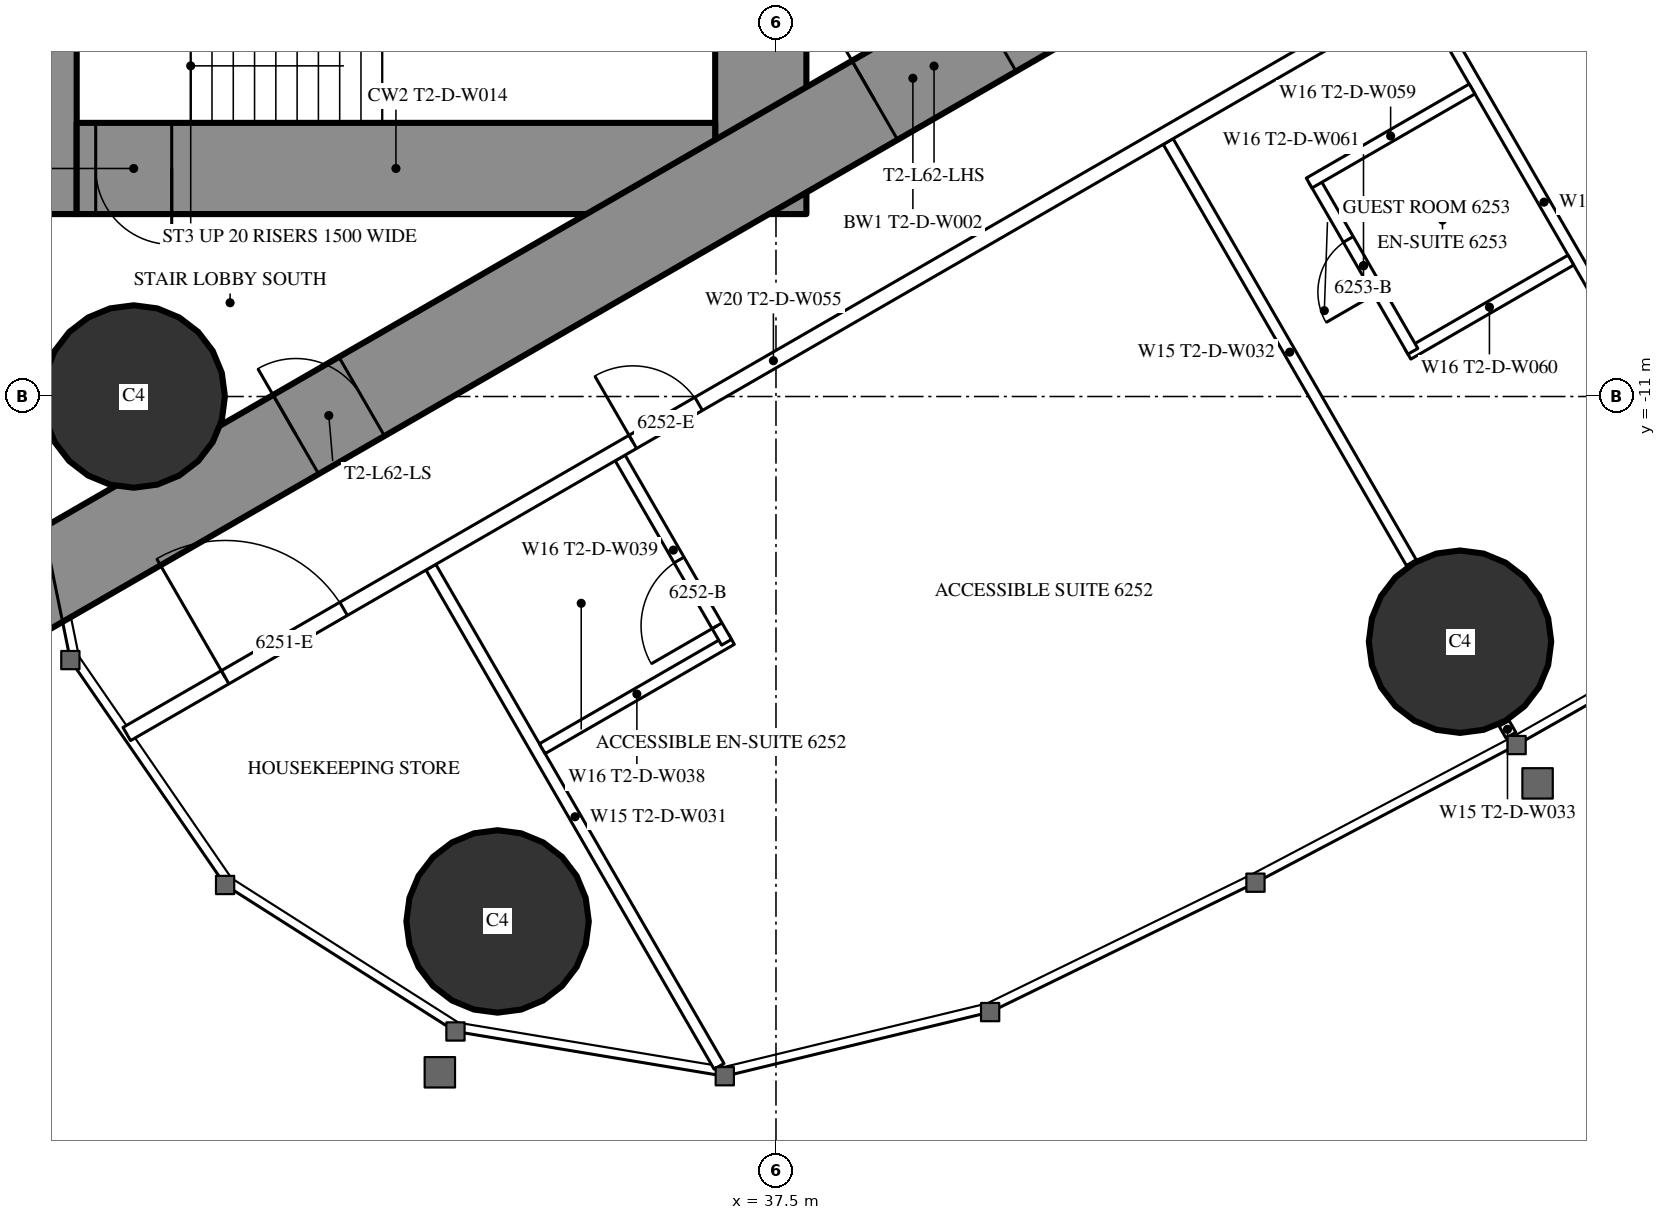
"""IFC4 building model, lengths in metres.
Left out: names, types, materials, properties, quantities, classifications, styles, units other than length and angle.
Written with IfcOpenShell. Run it as: python <this file> out.ifc"""

import sys

from ifc_helpers import new_model, si_unit, direction, frame, frame_2d, origin, origin_2d, place, context, subcontext, project, spatial, rectangle, circle, extrude, element, fill, save


model = new_model("IFC4")
c1 = context("Model", 3, precision=1e-05, world=origin(), true_north=direction((0.0, 1.0)))
c2 = subcontext(c1, "Body", "Model", "MODEL_VIEW")
j1 = project(units=[si_unit("LENGTHUNIT", "METRE"), si_unit("PLANEANGLEUNIT", "RADIAN")], contexts=[c1])
p1 = place(None, origin())
s1 = spatial("IfcSite", under=j1, at=p1, CompositionType="ELEMENT")
p2 = place(p1, origin())
s2 = spatial("IfcBuilding", under=s1, at=p2, CompositionType="ELEMENT")
p3 = place(p2, frame((0.0, 0.0, 233.3)))
s3 = spatial("IfcBuildingStorey", under=s2, at=p3, CompositionType="ELEMENT", Elevation=233.3)
for number, where, z_axis, x_axis in (
    (1, (33.837, -17.906, 0.0), (0.0, 0.0, 1.0), (1.0, 0.0, 0.0)),
    (2, (29.05, -11.0, 0.0), (0.0, 0.0, 1.0), (1.0, 0.0, 0.0)),
    (3, (46.499, -14.226, 0.0), (0.0, 0.0, 1.0), (1.0, 0.0, 0.0)),
):
    element("IfcColumn", number, at=place(p3, frame(where, z_axis=z_axis, x_axis=x_axis)), inside=s3, PredefinedType="COLUMN", context=c2, shape_type="SweptSolid", body=[
        extrude(circle(Radius=1.2, at=origin_2d()), origin(), (0.0, 0.0, 1.0), 3.6),
    ])
p4 = place(p3, frame((27.9, -8.6, 0.0), z_axis=(0.0, 0.0, 1.0), x_axis=(0.0, 1.0, 0.0)))
e4 = element("IfcWall", 4, at=p4, inside=s3, PredefinedType="SHEAR", context=c2, shape_type="SweptSolid", body=[
    extrude(rectangle(XDim=17.2, YDim=0.8, at=frame_2d((8.6, 0.0))), origin(), (0.0, 0.0, 1.0), 3.6),
])
p5 = place(p4, frame((9.35, 0.0, 0.0)))
e5 = element("IfcOpeningElement", 5, at=p5, cuts=e4, PredefinedType="OPENING", context=c2, shape_type="SweptSolid", body=[
    extrude(rectangle(XDim=0.9, YDim=2.2, at=frame_2d((0.45, 1.1))), frame((0.0, 0.41, 0.0), z_axis=(0.0, -1.0, 0.0), x_axis=(1.0, 0.0, 0.0)), (0.0, 0.0, 1.0), 0.82),
])
p6 = place(p3, frame((37.3, -8.6, 0.0), z_axis=(0.0, 0.0, 1.0), x_axis=(0.0, 1.0, 0.0)))
e6 = element("IfcWall", 6, at=p6, inside=s3, PredefinedType="SHEAR", context=c2, shape_type="SweptSolid", body=[
    extrude(rectangle(XDim=17.2, YDim=1.2, at=frame_2d((8.6, 0.0))), origin(), (0.0, 0.0, 1.0), 3.6),
])
p7 = place(p6, frame((7.7, 0.0, 0.0)))
e7 = element("IfcOpeningElement", 7, at=p7, cuts=e6, PredefinedType="OPENING", context=c2, shape_type="SweptSolid", body=[
    extrude(rectangle(XDim=1.8, YDim=2.2, at=frame_2d((0.9, 1.1))), frame((0.0, 0.61, 0.0), z_axis=(0.0, -1.0, 0.0), x_axis=(1.0, 0.0, 0.0)), (0.0, 0.0, 1.0), 1.22),
])
p8 = place(p3, frame((28.3, -8.0, 0.0), z_axis=(0.0, 0.0, 1.0), x_axis=(1.0, 0.0, 0.0)))
e8 = element("IfcWall", 8, at=p8, inside=s3, PredefinedType="SHEAR", context=c2, shape_type="SweptSolid", body=[
    extrude(rectangle(XDim=8.4, YDim=1.2, at=frame_2d((4.2, 0.0))), origin(), (0.0, 0.0, 1.0), 3.6),
])
p9 = place(p8, frame((0.25, 0.0, 0.0)))
e9 = element("IfcOpeningElement", 9, at=p9, cuts=e8, PredefinedType="OPENING", context=c2, shape_type="SweptSolid", body=[
    extrude(rectangle(XDim=1.0, YDim=2.2, at=frame_2d((0.5, 1.1))), frame((0.0, 0.61, 0.0), z_axis=(0.0, -1.0, 0.0), x_axis=(1.0, 0.0, 0.0)), (0.0, 0.0, 1.0), 1.22),
])
p10 = place(p3, frame((27.2, -13.8, 0.0), z_axis=(0.0, 0.0, 1.0), x_axis=(0.866027159892, 0.499996958321, 0.0)))
e10 = element("IfcWall", 10, at=p10, inside=s3, PredefinedType="SHEAR", context=c2, shape_type="SweptSolid", body=[
    extrude(rectangle(XDim=27.947, YDim=1.2, at=frame_2d((13.973, 0.0))), origin(), (0.0, 0.0, 1.0), 3.6),
])
p11 = place(p10, frame((4.6, 0.0, 0.0)))
e11 = element("IfcOpeningElement", 11, at=p11, cuts=e10, PredefinedType="OPENING", context=c2, shape_type="SweptSolid", body=[
    extrude(rectangle(XDim=1.0, YDim=2.2, at=frame_2d((0.5, 1.1))), frame((0.0, 0.61, 0.0), z_axis=(0.0, -1.0, 0.0), x_axis=(1.0, 0.0, 0.0)), (0.0, 0.0, 1.0), 1.22),
])
p12 = place(p10, frame((13.395, 0.0, 0.0)))
e12 = element("IfcOpeningElement", 12, at=p12, cuts=e10, PredefinedType="OPENING", context=c2, shape_type="SweptSolid", body=[
    extrude(rectangle(XDim=1.8, YDim=2.2, at=frame_2d((0.9, 1.1))), frame((0.0, 0.61, 0.0), z_axis=(0.0, -1.0, 0.0), x_axis=(1.0, 0.0, 0.0)), (0.0, 0.0, 1.0), 1.22),
])
p13 = place(p3, frame((32.96, -13.246, 0.0), z_axis=(0.0, 0.0, 1.0), x_axis=(0.500000236886, -0.866025267018, 0.0)))
e13 = element("IfcWall", 13, at=p13, inside=s3, PredefinedType="PARTITIONING", context=c2, shape_type="SweptSolid", body=[
    extrude(rectangle(XDim=7.583, YDim=0.15, at=frame_2d((3.791, 0.0))), origin(), (0.0, 0.0, 1.0), 3.35),
])
p14 = place(p3, frame((42.66, -7.646, 0.0), z_axis=(0.0, 0.0, 1.0), x_axis=(0.499996592859, -0.866027370889, 0.0)))
e14 = element("IfcWall", 14, at=p14, inside=s3, PredefinedType="PARTITIONING", context=c2, shape_type="SweptSolid", body=[
    extrude(rectangle(XDim=6.398, YDim=0.15, at=frame_2d((3.199, 0.0))), origin(), (0.0, 0.0, 1.0), 2.45),
])
p15 = place(p3, frame((47.079, -15.3, 0.0), z_axis=(0.0, 0.0, 1.0), x_axis=(0.499212083968, -0.866479829667, 0.0)))
e15 = element("IfcWall", 15, at=p15, inside=s3, PredefinedType="PARTITIONING", context=c2, shape_type="SweptSolid", body=[
    extrude(rectangle(XDim=0.179, YDim=0.15, at=frame_2d((0.09, 0.0))), origin(), (0.0, 0.0, 1.0), 2.45),
])
p16 = place(p3, frame((45.973, -5.617, 0.0), z_axis=(0.0, 0.0, 1.0), x_axis=(0.499985856986, -0.866033569104, 0.0)))
e16 = element("IfcWall", 16, at=p16, inside=s3, PredefinedType="PARTITIONING", context=c2, shape_type="SweptSolid", body=[
    extrude(rectangle(XDim=6.526, YDim=0.15, at=frame_2d((3.263, 0.0))), origin(), (0.0, 0.0, 1.0), 2.45),
])
p17 = place(p3, frame((34.425, -15.633, 0.0), z_axis=(0.0, 0.0, 1.0), x_axis=(0.866018712932, 0.500011588718, 0.0)))
e17 = element("IfcWall", 17, at=p17, inside=s3, PredefinedType="PARTITIONING", context=c2, shape_type="SweptSolid", body=[
    extrude(rectangle(XDim=2.875, YDim=0.15, at=frame_2d((1.438, 0.0))), origin(), (0.0, 0.0, 1.0), 3.35),
])
p18 = place(p3, frame((35.45, -11.808, 0.0), z_axis=(0.0, 0.0, 1.0), x_axis=(0.49994636267, -0.866056369097, 0.0)))
e18 = element("IfcWall", 18, at=p18, inside=s3, PredefinedType="PARTITIONING", context=c2, shape_type="SweptSolid", body=[
    extrude(rectangle(XDim=2.8, YDim=0.15, at=frame_2d((1.4, 0.0))), origin(), (0.0, 0.0, 1.0), 3.35),
])
p19 = place(p18, frame((1.55, 0.0, 0.0)))
e19 = element("IfcOpeningElement", 19, at=p19, cuts=e18, PredefinedType="OPENING", context=c2, shape_type="SweptSolid", body=[
    extrude(rectangle(XDim=1.0, YDim=2.2, at=frame_2d((0.5, 1.1))), frame((0.0, 0.085, 0.0), z_axis=(0.0, -1.0, 0.0), x_axis=(1.0, 0.0, 0.0)), (0.0, 0.0, 1.0), 0.17),
])
p20 = place(p3, frame((45.814, -10.443, 0.0), z_axis=(0.0, 0.0, 1.0), x_axis=(0.866073894602, 0.499916002032, 0.0)))
e20 = element("IfcWall", 20, at=p20, inside=s3, PredefinedType="PARTITIONING", context=c2, shape_type="SweptSolid", body=[
    extrude(rectangle(XDim=2.475, YDim=0.15, at=frame_2d((1.238, 0.0))), origin(), (0.0, 0.0, 1.0), 3.35),
])
p21 = place(p3, frame((44.579, -8.154, 0.0), z_axis=(0.0, 0.0, 1.0), x_axis=(0.500006934395, -0.866021400173, 0.0)))
e21 = element("IfcWall", 21, at=p21, inside=s3, PredefinedType="PARTITIONING", context=c2, shape_type="SweptSolid", body=[
    extrude(rectangle(XDim=2.6, YDim=0.15, at=frame_2d((1.3, 0.0))), origin(), (0.0, 0.0, 1.0), 3.35),
])
p22 = place(p21, frame((0.9, 0.0, 0.0)))
e22 = element("IfcOpeningElement", 22, at=p22, cuts=e21, PredefinedType="OPENING", context=c2, shape_type="SweptSolid", body=[
    extrude(rectangle(XDim=0.8, YDim=2.2, at=frame_2d((0.4, 1.1))), frame((0.0, 0.085, 0.0), z_axis=(0.0, -1.0, 0.0), x_axis=(1.0, 0.0, 0.0)), (0.0, 0.0, 1.0), 0.17),
])
p23 = place(p3, frame((44.514, -8.191, 0.0), z_axis=(0.0, 0.0, 1.0), x_axis=(0.866031185235, 0.4999899861, 0.0)))
e23 = element("IfcWall", 23, at=p23, inside=s3, PredefinedType="PARTITIONING", context=c2, shape_type="SweptSolid", body=[
    extrude(rectangle(XDim=2.475, YDim=0.15, at=frame_2d((1.238, 0.0))), origin(), (0.0, 0.0, 1.0), 3.35),
])
p24 = place(p3, frame((28.959, -15.44, 0.0), z_axis=(0.0, 0.0, 1.0), x_axis=(0.866025204199, 0.500000345692, 0.0)))
e24 = element("IfcWall", 24, at=p24, inside=s3, PredefinedType="PARTITIONING", context=c2, shape_type="SweptSolid", body=[
    extrude(rectangle(XDim=19.646, YDim=0.2, at=frame_2d((9.823, 0.0))), origin(), (0.0, 0.0, 1.0), 3.35),
])
p25 = place(p24, frame((1.494, 0.0, 0.0)))
e25 = element("IfcOpeningElement", 25, at=p25, cuts=e24, PredefinedType="OPENING", context=c2, shape_type="SweptSolid", body=[
    extrude(rectangle(XDim=1.8, YDim=2.03, at=frame_2d((0.9, 1.015))), frame((0.0, 0.11, 0.0), z_axis=(0.0, -1.0, 0.0), x_axis=(1.0, 0.0, 0.0)), (0.0, 0.0, 1.0), 0.22),
])
p26 = place(p24, frame((7.687, 0.0, 0.0)))
e26 = element("IfcOpeningElement", 26, at=p26, cuts=e24, PredefinedType="OPENING", context=c2, shape_type="SweptSolid", body=[
    extrude(rectangle(XDim=1.0, YDim=2.2, at=frame_2d((0.5, 1.1))), frame((0.0, 0.11, 0.0), z_axis=(0.0, -1.0, 0.0), x_axis=(1.0, 0.0, 0.0)), (0.0, 0.0, 1.0), 0.22),
])
p27 = place(p24, frame((18.321, 0.0, 0.0)))
e27 = element("IfcOpeningElement", 27, at=p27, cuts=e24, PredefinedType="OPENING", context=c2, shape_type="SweptSolid", body=[
    extrude(rectangle(XDim=0.95, YDim=2.2, at=frame_2d((0.475, 1.1))), frame((0.0, 0.11, 0.0), z_axis=(0.0, -1.0, 0.0), x_axis=(1.0, 0.0, 0.0)), (0.0, 0.0, 1.0), 0.22),
])
p28 = place(p25, origin())
e28 = element("IfcDoor", 28, at=p28, inside=s3, OperationType="DOUBLE_DOOR_SINGLE_SWING", PredefinedType="DOOR", context=c2, shape_type="SweptSolid", body=[
    extrude(rectangle(XDim=1.8, YDim=2.03, at=frame_2d((0.9, 1.015))), frame((0.0, 0.025, 0.0), z_axis=(0.0, -1.0, 0.0), x_axis=(1.0, 0.0, 0.0)), (0.0, 0.0, 1.0), 0.05),
])
fill(e25, e28)
p29 = place(p19, origin())
e29 = element("IfcDoor", 29, at=p29, inside=s3, OperationType="SINGLE_SWING_RIGHT", PredefinedType="DOOR", context=c2, shape_type="SweptSolid", body=[
    extrude(rectangle(XDim=1.0, YDim=2.2, at=frame_2d((0.5, 1.1))), frame((0.0, 0.025, 0.0), z_axis=(0.0, -1.0, 0.0), x_axis=(1.0, 0.0, 0.0)), (0.0, 0.0, 1.0), 0.05),
])
fill(e19, e29)
p30 = place(p26, origin())
e30 = element("IfcDoor", 30, at=p30, inside=s3, OperationType="SINGLE_SWING_LEFT", PredefinedType="DOOR", context=c2, shape_type="SweptSolid", body=[
    extrude(rectangle(XDim=1.0, YDim=2.2, at=frame_2d((0.5, 1.1))), frame((0.0, 0.025, 0.0), z_axis=(0.0, -1.0, 0.0), x_axis=(1.0, 0.0, 0.0)), (0.0, 0.0, 1.0), 0.05),
])
fill(e26, e30)
p31 = place(p22, origin())
e31 = element("IfcDoor", 31, at=p31, inside=s3, OperationType="SINGLE_SWING_RIGHT", PredefinedType="DOOR", context=c2, shape_type="SweptSolid", body=[
    extrude(rectangle(XDim=0.8, YDim=2.2, at=frame_2d((0.4, 1.1))), frame((0.0, 0.025, 0.0), z_axis=(0.0, -1.0, 0.0), x_axis=(1.0, 0.0, 0.0)), (0.0, 0.0, 1.0), 0.05),
])
fill(e22, e31)
p32 = place(p11, origin())
e32 = element("IfcDoor", 32, at=p32, inside=s3, OperationType="SINGLE_SWING_LEFT", PredefinedType="DOOR", context=c2, shape_type="SweptSolid", body=[
    extrude(rectangle(XDim=1.0, YDim=2.2, at=frame_2d((0.5, 1.1))), frame((0.0, 0.025, 0.0), z_axis=(0.0, -1.0, 0.0), x_axis=(1.0, 0.0, 0.0)), (0.0, 0.0, 1.0), 0.05),
])
fill(e11, e32)
p33 = place(p12, origin())
e33 = element("IfcDoor", 33, at=p33, inside=s3, OperationType="DOUBLE_DOOR_SINGLE_SWING", PredefinedType="DOOR", context=c2, shape_type="SweptSolid", body=[
    extrude(rectangle(XDim=1.8, YDim=2.2, at=frame_2d((0.9, 1.1))), frame((0.0, 0.025, 0.0), z_axis=(0.0, -1.0, 0.0), x_axis=(1.0, 0.0, 0.0)), (0.0, 0.0, 1.0), 0.05),
])
fill(e12, e33)
p34 = place(p9, origin())
e34 = element("IfcDoor", 34, at=p34, inside=s3, OperationType="SINGLE_SWING_RIGHT", PredefinedType="DOOR", context=c2, shape_type="SweptSolid", body=[
    extrude(rectangle(XDim=1.0, YDim=2.2, at=frame_2d((0.5, 1.1))), frame((0.0, 0.025, 0.0), z_axis=(0.0, -1.0, 0.0), x_axis=(1.0, 0.0, 0.0)), (0.0, 0.0, 1.0), 0.05),
])
fill(e9, e34)
save(model, sys.argv[1])
